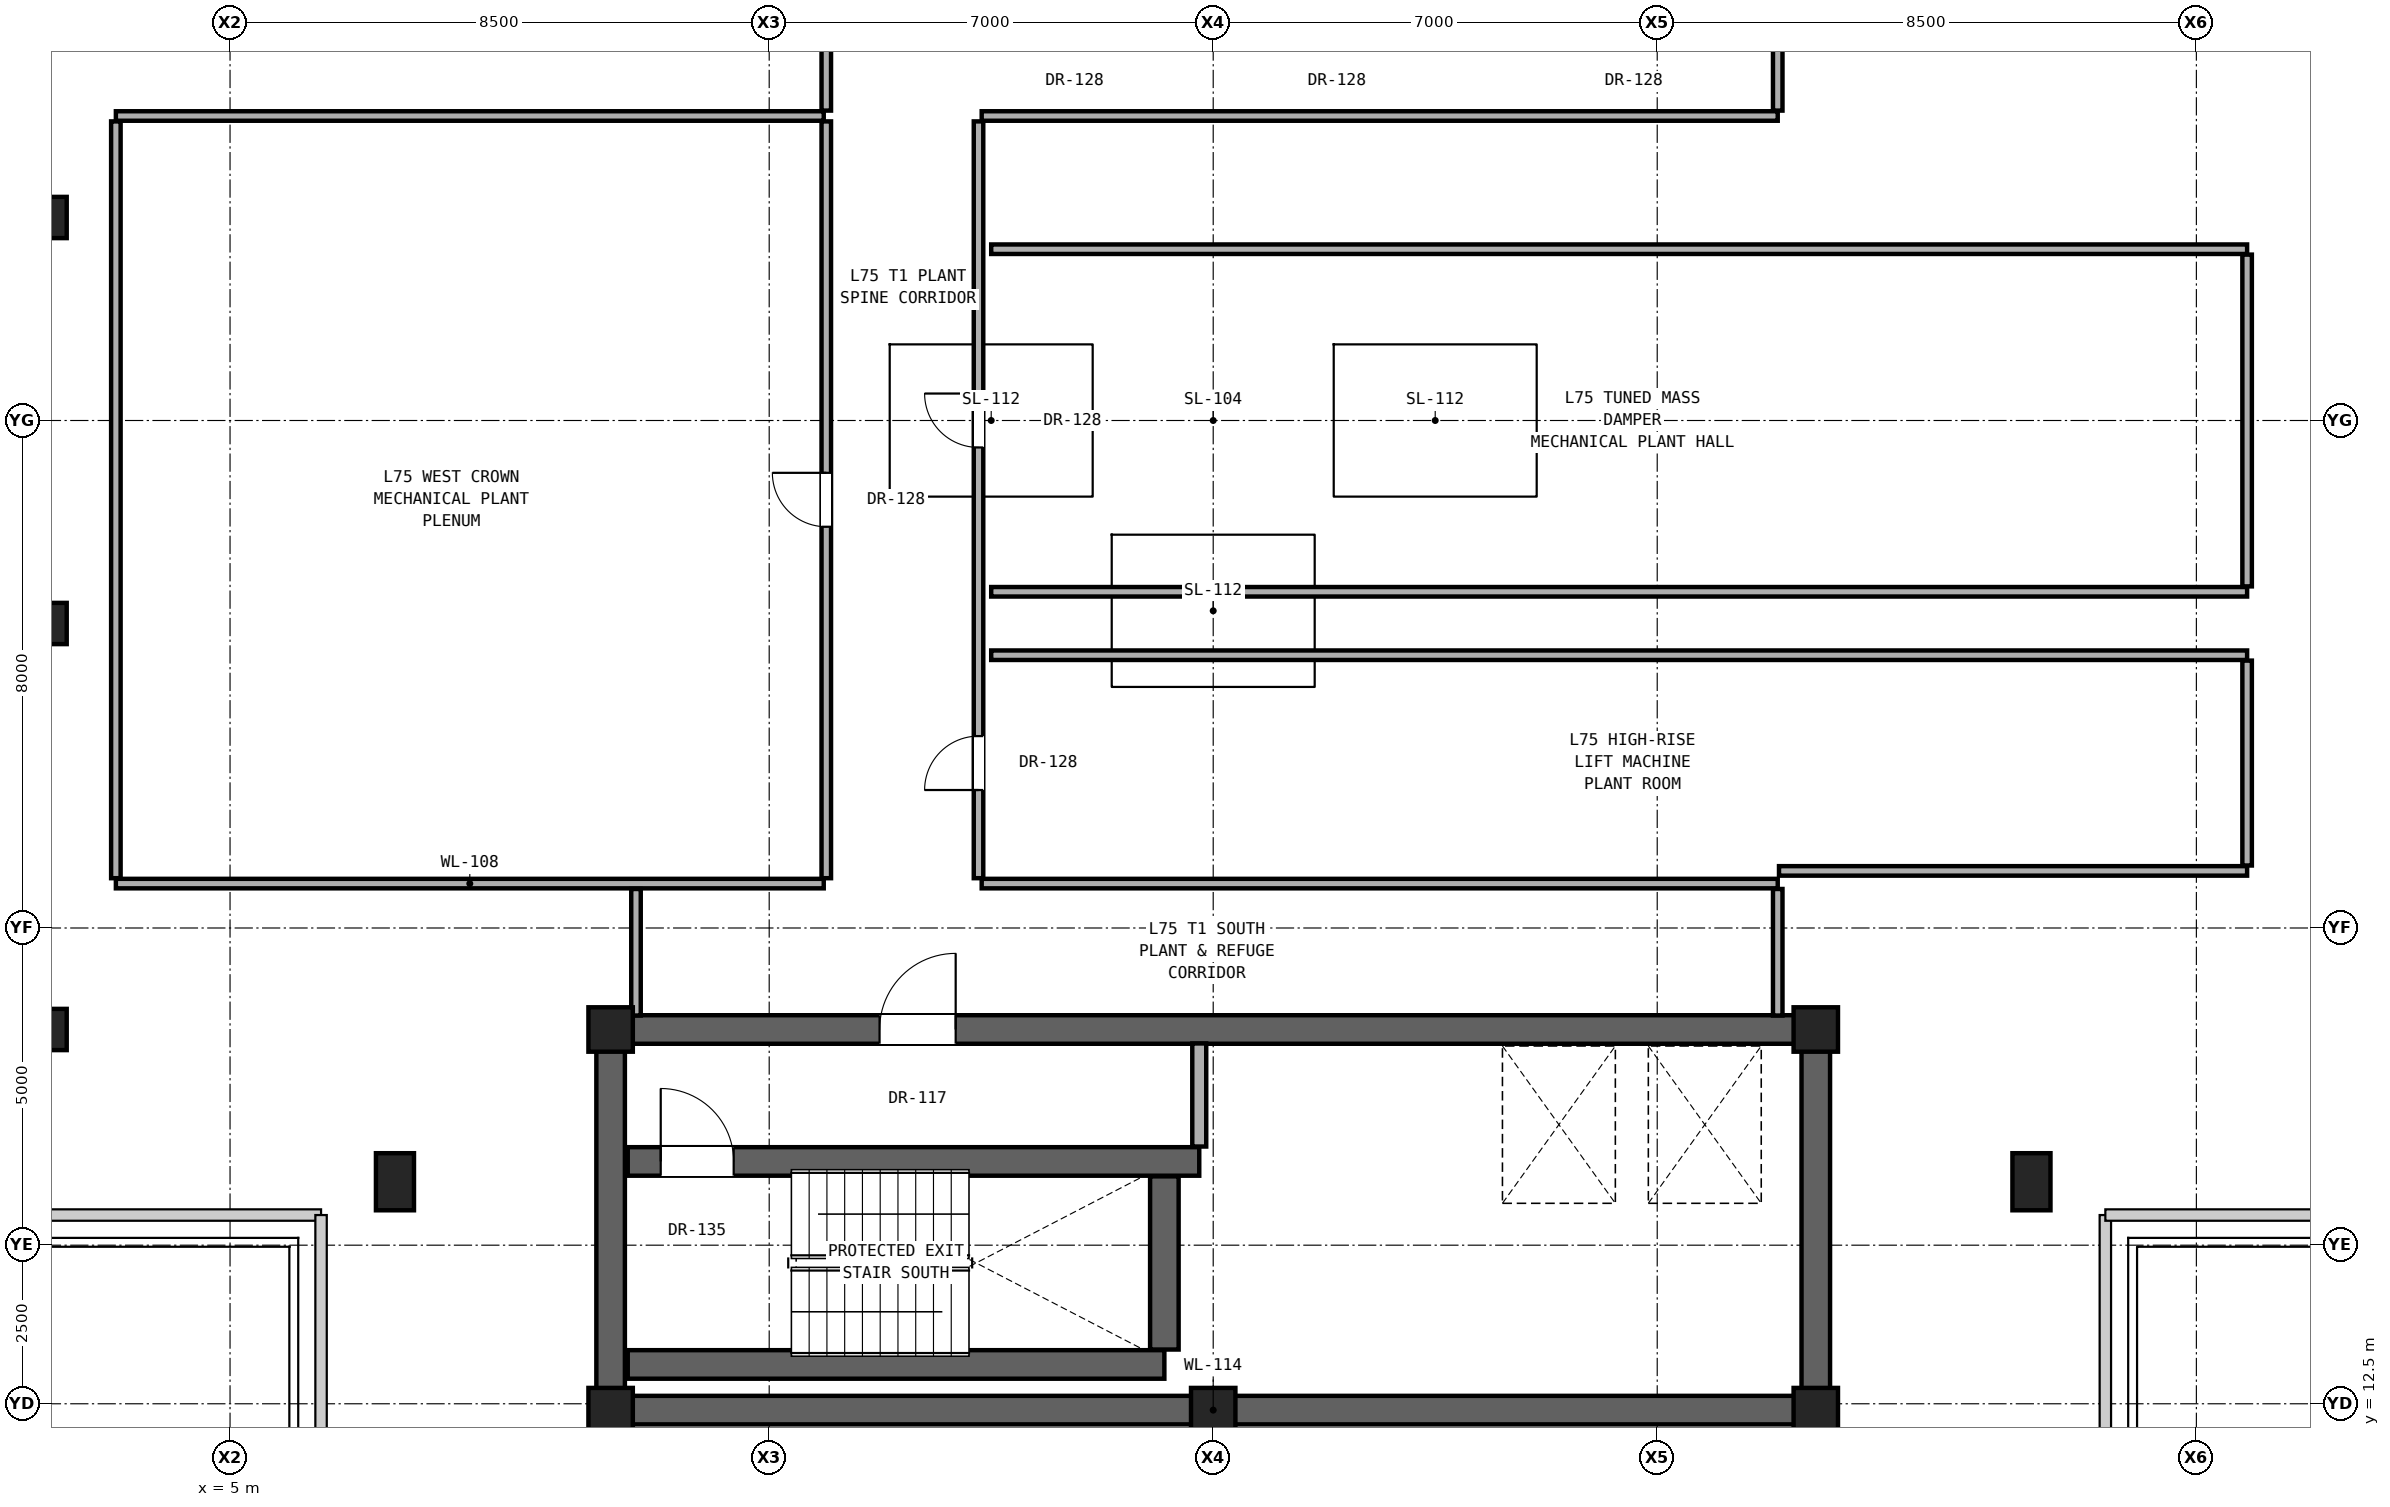
"""IFC4 building model, lengths in metres.
Left out: names, types, materials, properties, quantities, classifications, styles, units other than length and angle.
Written with IfcOpenShell. Run it as: python <this file> out.ifc"""

import sys

from ifc_helpers import new_model, si_unit, direction, frame, frame_2d, origin, origin_2d, place, context, subcontext, project, spatial, rectangle, hollow_rectangle, extrude, element, fill, save


model = new_model("IFC4")
c1 = context("Model", 3, precision=1e-05, world=origin(), true_north=direction((0.0, 1.0)))
c2 = subcontext(c1, "Body", "Model", "MODEL_VIEW")
j1 = project(units=[si_unit("LENGTHUNIT", "METRE"), si_unit("PLANEANGLEUNIT", "RADIAN")], contexts=[c1])
p1 = place(None, origin())
s1 = spatial("IfcSite", under=j1, at=p1, CompositionType="ELEMENT")
p2 = place(p1, origin())
s2 = spatial("IfcBuilding", under=s1, at=p2, CompositionType="ELEMENT")
p3 = place(p2, frame((0.0, 0.0, 263.5)))
s3 = spatial("IfcBuildingStorey", under=s2, at=p3, CompositionType="ELEMENT", Elevation=263.5)
for number, where, z_axis, x_axis in (
    (1, (11.0, 12.4, 0.0), (0.0, 0.0, 1.0), (1.0, 0.0, 0.0)),
    (2, (20.5, 12.4, 0.0), (0.0, 0.0, 1.0), (1.0, 0.0, 0.0)),
    (3, (30.0, 12.4, 0.0), (0.0, 0.0, 1.0), (1.0, 0.0, 0.0)),
    (4, (11.0, 18.4, 0.0), (0.0, 0.0, 1.0), (1.0, 0.0, 0.0)),
    (5, (30.0, 18.4, 0.0), (0.0, 0.0, 1.0), (1.0, 0.0, 0.0)),
):
    element("IfcColumn", number, at=place(p3, frame(where, z_axis=z_axis, x_axis=x_axis)), inside=s3, PredefinedType="COLUMN", context=c2, shape_type="SweptSolid", body=[
        extrude(rectangle(XDim=0.7, YDim=0.7, at=origin_2d()), origin(), (0.0, 0.0, 1.0), 2.6),
    ])
for number, where, z_axis, x_axis in (
    (6, (2.1, 18.4, 0.0), (0.0, 0.0, 1.0), (1.0, 0.0, 0.0)),
    (7, (2.1, 24.8, 0.0), (0.0, 0.0, 1.0), (1.0, 0.0, 0.0)),
    (8, (2.1, 31.2, 0.0), (0.0, 0.0, 1.0), (1.0, 0.0, 0.0)),
):
    element("IfcColumn", number, at=place(p3, frame(where, z_axis=z_axis, x_axis=x_axis)), inside=s3, PredefinedType="COLUMN", context=c2, shape_type="SweptSolid", body=[
        extrude(hollow_rectangle(XDim=0.65, YDim=0.65, WallThickness=0.036, at=origin_2d()), origin(), (0.0, 0.0, 1.0), 2.6),
    ])
for number, where, z_axis, x_axis in (
    (9, (7.6, 16.0, 0.0), (0.0, 0.0, 1.0), (1.0, 0.0, 0.0)),
    (10, (33.4, 16.0, 0.0), (0.0, 0.0, 1.0), (1.0, 0.0, 0.0)),
):
    element("IfcColumn", number, at=place(p3, frame(where, z_axis=z_axis, x_axis=x_axis)), inside=s3, PredefinedType="PILASTER", context=c2, shape_type="SweptSolid", body=[
        extrude(rectangle(XDim=0.6, YDim=0.9, at=origin_2d()), origin(), (0.0, 0.0, 1.0), 2.6),
    ])
p4 = place(p3, frame((11.0, 12.4, 0.0), z_axis=(0.0, 0.0, 1.0), x_axis=(1.0, 0.0, 0.0)))
e11 = element("IfcWall", 11, at=p4, inside=s3, PredefinedType="SHEAR", context=c2, shape_type="SweptSolid", body=[
    extrude(rectangle(XDim=19.0, YDim=0.45, at=frame_2d((9.5, 0.0))), origin(), (0.0, 0.0, 1.0), 2.38),
])
for number, where, z_axis, x_axis in (
    (12, (11.0, 12.4, 0.0), (0.0, 0.0, 1.0), (0.0, 1.0, 0.0)),
    (13, (30.0, 12.4, 0.0), (0.0, 0.0, 1.0), (0.0, 1.0, 0.0)),
):
    element("IfcWall", number, at=place(p3, frame(where, z_axis=z_axis, x_axis=x_axis)), inside=s3, PredefinedType="SHEAR", context=c2, shape_type="SweptSolid", body=[
        extrude(rectangle(XDim=6.0, YDim=0.45, at=frame_2d((3.0, 0.0))), origin(), (0.0, 0.0, 1.0), 2.38),
    ])
p5 = place(p3, frame((11.0, 18.4, 0.0), z_axis=(0.0, 0.0, 1.0), x_axis=(1.0, 0.0, 0.0)))
e14 = element("IfcWall", 14, at=p5, inside=s3, PredefinedType="SHEAR", context=c2, shape_type="SweptSolid", body=[
    extrude(rectangle(XDim=19.0, YDim=0.45, at=frame_2d((9.5, 0.0))), origin(), (0.0, 0.0, 1.0), 2.38),
])
p6 = place(p5, frame((4.24, 0.0, 0.0)))
e15 = element("IfcOpeningElement", 15, at=p6, cuts=e14, PredefinedType="OPENING", context=c2, shape_type="SweptSolid", body=[
    extrude(rectangle(XDim=1.2, YDim=2.25, at=frame_2d((0.6, 1.125))), frame((0.0, 0.235, 0.0), z_axis=(0.0, -1.0, 0.0), x_axis=(1.0, 0.0, 0.0)), (0.0, 0.0, 1.0), 0.47),
])
p7 = place(p3, frame((11.27, 13.12, 0.0), z_axis=(0.0, 0.0, 1.0), x_axis=(1.0, 0.0, 0.0)))
e16 = element("IfcWall", 16, at=p7, inside=s3, PredefinedType="SHEAR", context=c2, shape_type="SweptSolid", body=[
    extrude(rectangle(XDim=8.46, YDim=0.45, at=frame_2d((4.23, 0.0))), origin(), (0.0, 0.0, 1.0), 2.38),
])
p8 = place(p3, frame((11.27, 16.32, 0.0), z_axis=(0.0, 0.0, 1.0), x_axis=(1.0, 0.0, 0.0)))
e17 = element("IfcWall", 17, at=p8, inside=s3, PredefinedType="SHEAR", context=c2, shape_type="SweptSolid", body=[
    extrude(rectangle(XDim=9.01, YDim=0.45, at=frame_2d((4.505, 0.0))), origin(), (0.0, 0.0, 1.0), 2.38),
])
p9 = place(p8, frame((0.52, 0.0, 0.0)))
e18 = element("IfcOpeningElement", 18, at=p9, cuts=e17, PredefinedType="OPENING", context=c2, shape_type="SweptSolid", body=[
    extrude(rectangle(XDim=1.15, YDim=2.2, at=frame_2d((0.575, 1.1))), frame((0.0, 0.235, 0.0), z_axis=(0.0, -1.0, 0.0), x_axis=(1.0, 0.0, 0.0)), (0.0, 0.0, 1.0), 0.47),
])
p10 = place(p3, frame((3.2, 20.7, 0.0), z_axis=(0.0, 0.0, 1.0), x_axis=(1.0, 0.0, 0.0)))
e19 = element("IfcWall", 19, at=p10, inside=s3, PredefinedType="PARTITIONING", context=c2, shape_type="SweptSolid", body=[
    extrude(rectangle(XDim=11.16, YDim=0.15, at=frame_2d((5.58, 0.0))), origin(), (0.0, 0.0, 1.0), 2.042),
])
p11 = place(p3, frame((16.85, 20.7, 0.0), z_axis=(0.0, 0.0, 1.0), x_axis=(1.0, 0.0, 0.0)))
e20 = element("IfcWall", 20, at=p11, inside=s3, PredefinedType="PARTITIONING", context=c2, shape_type="SweptSolid", body=[
    extrude(rectangle(XDim=12.55, YDim=0.15, at=frame_2d((6.275, 0.0))), origin(), (0.0, 0.0, 1.0), 2.042),
])
p12 = place(p3, frame((29.42, 20.9, 0.0), z_axis=(0.0, 0.0, 1.0), x_axis=(1.0, 0.0, 0.0)))
e21 = element("IfcWall", 21, at=p12, inside=s3, PredefinedType="PARTITIONING", context=c2, shape_type="SweptSolid", body=[
    extrude(rectangle(XDim=7.38, YDim=0.15, at=frame_2d((3.69, 0.0))), origin(), (0.0, 0.0, 1.0), 2.042),
])
for number, where, z_axis, x_axis in (
    (22, (17.0, 24.3, 0.0), (0.0, 0.0, 1.0), (1.0, 0.0, 0.0)),
    (23, (17.0, 25.3, 0.0), (0.0, 0.0, 1.0), (1.0, 0.0, 0.0)),
    (24, (17.0, 30.7, 0.0), (0.0, 0.0, 1.0), (1.0, 0.0, 0.0)),
):
    element("IfcWall", number, at=place(p3, frame(where, z_axis=z_axis, x_axis=x_axis)), inside=s3, PredefinedType="PARTITIONING", context=c2, shape_type="SweptSolid", body=[
        extrude(rectangle(XDim=19.8, YDim=0.15, at=frame_2d((9.9, 0.0))), origin(), (0.0, 0.0, 1.0), 2.042),
    ])
p13 = place(p3, frame((3.2, 32.8, 0.0), z_axis=(0.0, 0.0, 1.0), x_axis=(1.0, 0.0, 0.0)))
e25 = element("IfcWall", 25, at=p13, inside=s3, PredefinedType="PARTITIONING", context=c2, shape_type="SweptSolid", body=[
    extrude(rectangle(XDim=11.16, YDim=0.15, at=frame_2d((5.58, 0.0))), origin(), (0.0, 0.0, 1.0), 2.042),
])
p14 = place(p3, frame((16.85, 32.8, 0.0), z_axis=(0.0, 0.0, 1.0), x_axis=(1.0, 0.0, 0.0)))
e26 = element("IfcWall", 26, at=p14, inside=s3, PredefinedType="PARTITIONING", context=c2, shape_type="SweptSolid", body=[
    extrude(rectangle(XDim=12.55, YDim=0.15, at=frame_2d((6.275, 0.0))), origin(), (0.0, 0.0, 1.0), 2.042),
])
p15 = place(p3, frame((3.2, 20.785, 0.0), z_axis=(0.0, 0.0, 1.0), x_axis=(0.0, 1.0, 0.0)))
e27 = element("IfcWall", 27, at=p15, inside=s3, PredefinedType="PARTITIONING", context=c2, shape_type="SweptSolid", body=[
    extrude(rectangle(XDim=11.93, YDim=0.15, at=frame_2d((5.965, 0.0))), origin(), (0.0, 0.0, 1.0), 2.042),
])
p16 = place(p3, frame((11.4, 18.62, 0.0), z_axis=(0.0, 0.0, 1.0), x_axis=(0.0, 1.0, 0.0)))
e28 = element("IfcWall", 28, at=p16, inside=s3, PredefinedType="PARTITIONING", context=c2, shape_type="SweptSolid", body=[
    extrude(rectangle(XDim=1.995, YDim=0.15, at=frame_2d((0.998, 0.0))), origin(), (0.0, 0.0, 1.0), 2.38),
])
p17 = place(p3, frame((14.4, 20.785, 0.0), z_axis=(0.0, 0.0, 1.0), x_axis=(0.0, 1.0, 0.0)))
e29 = element("IfcWall", 29, at=p17, inside=s3, PredefinedType="PARTITIONING", context=c2, shape_type="SweptSolid", body=[
    extrude(rectangle(XDim=11.93, YDim=0.15, at=frame_2d((5.965, 0.0))), origin(), (0.0, 0.0, 1.0), 2.042),
])
p18 = place(p17, frame((5.54, 0.0, 0.0)))
e30 = element("IfcOpeningElement", 30, at=p18, cuts=e29, PredefinedType="OPENING", context=c2, shape_type="SweptSolid", body=[
    extrude(rectangle(XDim=0.85, YDim=2.01, at=frame_2d((0.425, 1.005))), frame((0.0, 0.085, 0.0), z_axis=(0.0, -1.0, 0.0), x_axis=(1.0, 0.0, 0.0)), (0.0, 0.0, 1.0), 0.17),
])
p19 = place(p3, frame((14.4, 32.885, 0.0), z_axis=(0.0, 0.0, 1.0), x_axis=(0.0, 1.0, 0.0)))
e31 = element("IfcWall", 31, at=p19, inside=s3, PredefinedType="PARTITIONING", context=c2, shape_type="SweptSolid", body=[
    extrude(rectangle(XDim=1.48, YDim=0.15, at=frame_2d((0.74, 0.0))), origin(), (0.0, 0.0, 1.0), 2.38),
])
p20 = place(p3, frame((16.8, 20.785, 0.0), z_axis=(0.0, 0.0, 1.0), x_axis=(0.0, 1.0, 0.0)))
e32 = element("IfcWall", 32, at=p20, inside=s3, PredefinedType="PARTITIONING", context=c2, shape_type="SweptSolid", body=[
    extrude(rectangle(XDim=11.93, YDim=0.15, at=frame_2d((5.965, 0.0))), origin(), (0.0, 0.0, 1.0), 2.042),
])
p21 = place(p20, frame((6.79, 0.0, 0.0)))
e33 = element("IfcOpeningElement", 33, at=p21, cuts=e32, PredefinedType="OPENING", context=c2, shape_type="SweptSolid", body=[
    extrude(rectangle(XDim=0.85, YDim=2.01, at=frame_2d((0.425, 1.005))), frame((0.0, 0.085, 0.0), z_axis=(0.0, -1.0, 0.0), x_axis=(1.0, 0.0, 0.0)), (0.0, 0.0, 1.0), 0.17),
])
p22 = place(p20, frame((1.39, 0.0, 0.0)))
e34 = element("IfcOpeningElement", 34, at=p22, cuts=e32, PredefinedType="OPENING", context=c2, shape_type="SweptSolid", body=[
    extrude(rectangle(XDim=0.85, YDim=2.01, at=frame_2d((0.425, 1.005))), frame((0.0, 0.085, 0.0), z_axis=(0.0, -1.0, 0.0), x_axis=(1.0, 0.0, 0.0)), (0.0, 0.0, 1.0), 0.17),
])
p23 = place(p3, frame((19.73, 13.355, 0.0), z_axis=(0.0, 0.0, 1.0), x_axis=(0.0, 1.0, 0.0)))
e35 = element("IfcWall", 35, at=p23, inside=s3, PredefinedType="SHEAR", context=c2, shape_type="SweptSolid", body=[
    extrude(rectangle(XDim=2.73, YDim=0.45, at=frame_2d((1.365, 0.0))), origin(), (0.0, 0.0, 1.0), 2.38),
])
p24 = place(p3, frame((20.28, 16.555, 0.0), z_axis=(0.0, 0.0, 1.0), x_axis=(0.0, 1.0, 0.0)))
e36 = element("IfcWall", 36, at=p24, inside=s3, PredefinedType="SOLIDWALL", context=c2, shape_type="SweptSolid", body=[
    extrude(rectangle(XDim=1.625, YDim=0.22, at=frame_2d((0.812, 0.0))), origin(), (0.0, 0.0, 1.0), 2.38),
])
p25 = place(p3, frame((29.4, 18.62, 0.0), z_axis=(0.0, 0.0, 1.0), x_axis=(0.0, 1.0, 0.0)))
e37 = element("IfcWall", 37, at=p25, inside=s3, PredefinedType="PARTITIONING", context=c2, shape_type="SweptSolid", body=[
    extrude(rectangle(XDim=1.995, YDim=0.15, at=frame_2d((0.998, 0.0))), origin(), (0.0, 0.0, 1.0), 2.38),
])
p26 = place(p3, frame((29.4, 32.885, 0.0), z_axis=(0.0, 0.0, 1.0), x_axis=(0.0, 1.0, 0.0)))
e38 = element("IfcWall", 38, at=p26, inside=s3, PredefinedType="PARTITIONING", context=c2, shape_type="SweptSolid", body=[
    extrude(rectangle(XDim=1.445, YDim=0.15, at=frame_2d((0.723, 0.0))), origin(), (0.0, 0.0, 1.0), 2.38),
])
p27 = place(p3, frame((36.8, 20.985, 0.0), z_axis=(0.0, 0.0, 1.0), x_axis=(0.0, 1.0, 0.0)))
e39 = element("IfcWall", 39, at=p27, inside=s3, PredefinedType="PARTITIONING", context=c2, shape_type="SweptSolid", body=[
    extrude(rectangle(XDim=3.23, YDim=0.15, at=frame_2d((1.615, 0.0))), origin(), (0.0, 0.0, 1.0), 2.38),
])
p28 = place(p3, frame((36.8, 25.385, 0.0), z_axis=(0.0, 0.0, 1.0), x_axis=(0.0, 1.0, 0.0)))
e40 = element("IfcWall", 40, at=p28, inside=s3, PredefinedType="PARTITIONING", context=c2, shape_type="SweptSolid", body=[
    extrude(rectangle(XDim=5.23, YDim=0.15, at=frame_2d((2.615, 0.0))), origin(), (0.0, 0.0, 1.0), 2.38),
])
p29 = place(p6, origin())
e41 = element("IfcDoor", 41, at=p29, inside=s3, OperationType="SINGLE_SWING_RIGHT", PredefinedType="DOOR", context=c2, shape_type="SweptSolid", body=[
    extrude(rectangle(XDim=1.2, YDim=2.25, at=frame_2d((0.6, 1.125))), frame((0.0, 0.025, 0.0), z_axis=(0.0, -1.0, 0.0), x_axis=(1.0, 0.0, 0.0)), (0.0, 0.0, 1.0), 0.05),
])
fill(e15, e41)
p30 = place(p9, origin())
e42 = element("IfcDoor", 42, at=p30, inside=s3, OperationType="SINGLE_SWING_LEFT", PredefinedType="DOOR", context=c2, shape_type="SweptSolid", body=[
    extrude(rectangle(XDim=1.15, YDim=2.2, at=frame_2d((0.575, 1.1))), frame((0.0, 0.025, 0.0), z_axis=(0.0, -1.0, 0.0), x_axis=(1.0, 0.0, 0.0)), (0.0, 0.0, 1.0), 0.05),
])
fill(e18, e42)
p31 = place(p21, origin())
e43 = element("IfcDoor", 43, at=p31, inside=s3, OperationType="SINGLE_SWING_RIGHT", PredefinedType="DOOR", context=c2, shape_type="SweptSolid", body=[
    extrude(rectangle(XDim=0.85, YDim=2.01, at=frame_2d((0.425, 1.005))), frame((0.0, 0.025, 0.0), z_axis=(0.0, -1.0, 0.0), x_axis=(1.0, 0.0, 0.0)), (0.0, 0.0, 1.0), 0.05),
])
fill(e33, e43)
p32 = place(p22, origin())
e44 = element("IfcDoor", 44, at=p32, inside=s3, OperationType="SINGLE_SWING_LEFT", PredefinedType="DOOR", context=c2, shape_type="SweptSolid", body=[
    extrude(rectangle(XDim=0.85, YDim=2.01, at=frame_2d((0.425, 1.005))), frame((0.0, 0.025, 0.0), z_axis=(0.0, -1.0, 0.0), x_axis=(1.0, 0.0, 0.0)), (0.0, 0.0, 1.0), 0.05),
])
fill(e34, e44)
p33 = place(p18, origin())
e45 = element("IfcDoor", 45, at=p33, inside=s3, OperationType="SINGLE_SWING_RIGHT", PredefinedType="DOOR", context=c2, shape_type="SweptSolid", body=[
    extrude(rectangle(XDim=0.85, YDim=2.01, at=frame_2d((0.425, 1.005))), frame((0.0, 0.025, 0.0), z_axis=(0.0, -1.0, 0.0), x_axis=(1.0, 0.0, 0.0)), (0.0, 0.0, 1.0), 0.05),
])
fill(e30, e45)
save(model, sys.argv[1])
